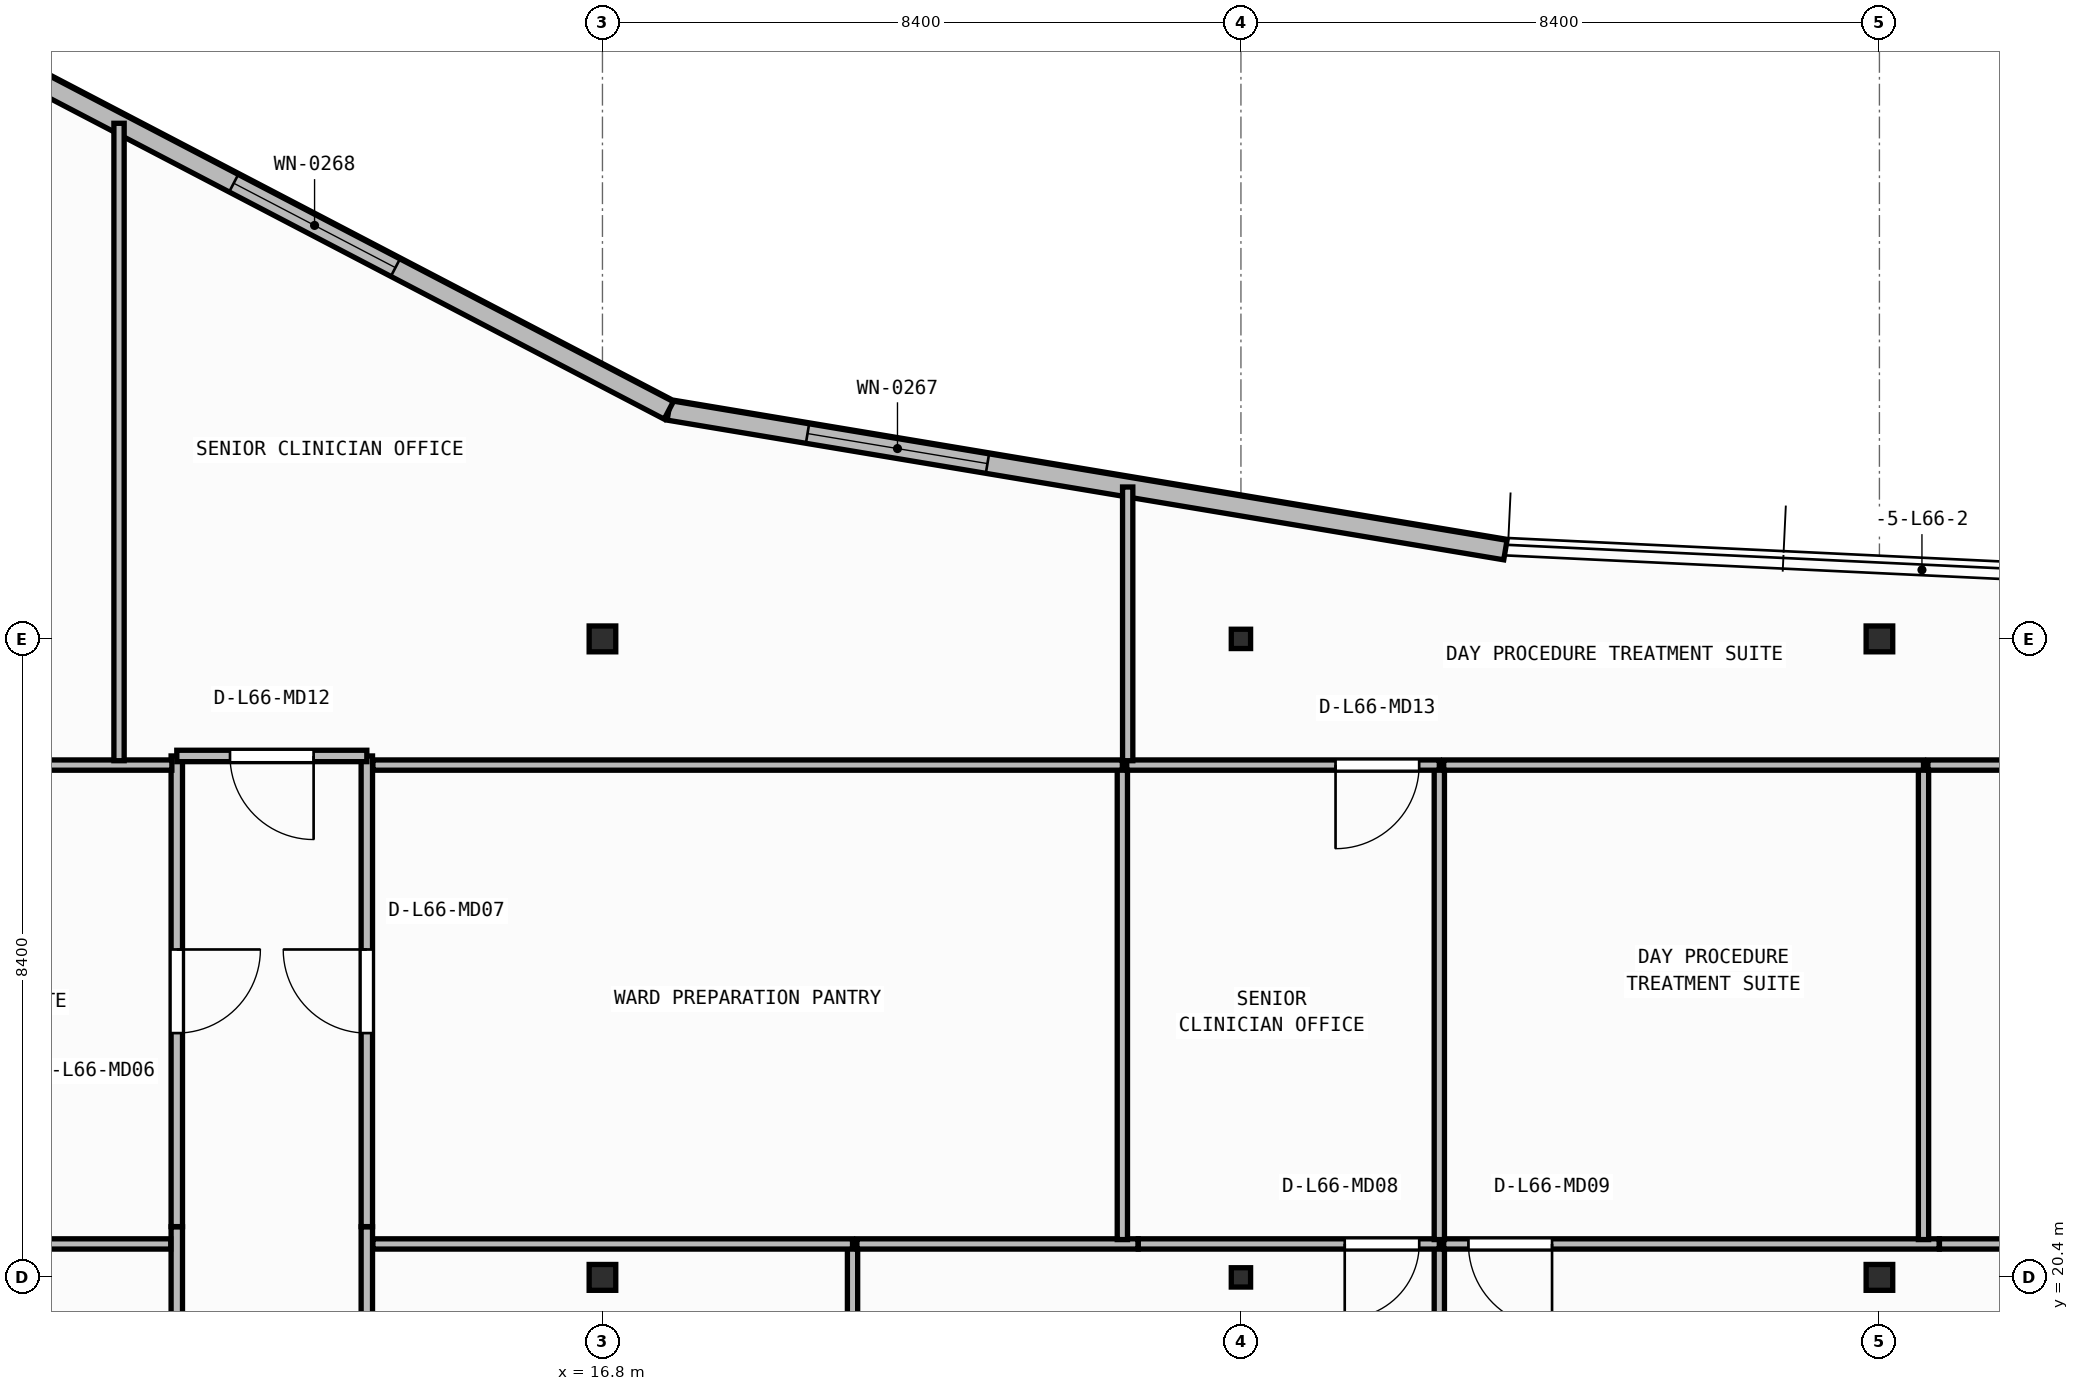
"""IFC4 building model, lengths in metres.
Left out: names, types, materials, properties, quantities, classifications, styles, units other than length and angle.
Written with IfcOpenShell. Run it as: python <this file> out.ifc"""

import sys

from ifc_helpers import new_model, si_unit, direction, frame, frame_2d, origin, origin_2d, place, context, subcontext, project, spatial, rectangle, i_section, extrude, element, fill, save


model = new_model("IFC4")
c1 = context("Model", 3, precision=1e-05, world=origin(), true_north=direction((0.0, 1.0)))
c2 = subcontext(c1, "Body", "Model", "MODEL_VIEW")
j1 = project(units=[si_unit("LENGTHUNIT", "METRE"), si_unit("PLANEANGLEUNIT", "RADIAN")], contexts=[c1])
p1 = place(None, origin())
s1 = spatial("IfcSite", under=j1, at=p1, CompositionType="ELEMENT")
p2 = place(p1, origin())
s2 = spatial("IfcBuilding", under=s1, at=p2, CompositionType="ELEMENT")
p3 = place(p2, frame((0.0, 0.0, 268.4)))
s3 = spatial("IfcBuildingStorey", under=s2, at=p3, CompositionType="ELEMENT", Elevation=268.4)
p4 = place(p3, frame((16.8, 20.4, 0.0), z_axis=(0.0, 0.0, 1.0), x_axis=(1.0, 0.0, 0.0)))
e1 = element("IfcColumn", 1, at=p4, inside=s3, PredefinedType="COLUMN", context=c2, shape_type="SweptSolid", body=[
    extrude(i_section(OverallWidth=0.35, OverallDepth=0.34, WebThickness=0.016, FlangeThickness=0.028, at=origin_2d()), origin(), (0.0, 0.0, 1.0), 3.95),
])
p5 = place(p3, frame((25.2, 20.4, 0.0), z_axis=(0.0, 0.0, 1.0), x_axis=(1.0, 0.0, 0.0)))
e2 = element("IfcColumn", 2, at=p5, inside=s3, PredefinedType="COLUMN", context=c2, shape_type="SweptSolid", body=[
    extrude(i_section(OverallWidth=0.254, OverallDepth=0.254, WebThickness=0.009, FlangeThickness=0.014, FilletRadius=0.013, at=origin_2d()), origin(), (0.0, 0.0, 1.0), 3.95),
])
for number, where, z_axis, x_axis in (
    (3, (33.6, 20.4, 0.0), (0.0, 0.0, 1.0), (1.0, 0.0, 0.0)),
    (4, (16.8, 28.8, 0.0), (0.0, 0.0, 1.0), (1.0, 0.0, 0.0)),
):
    element("IfcColumn", number, at=place(p3, frame(where, z_axis=z_axis, x_axis=x_axis)), inside=s3, PredefinedType="COLUMN", context=c2, shape_type="SweptSolid", body=[
        extrude(i_section(OverallWidth=0.35, OverallDepth=0.34, WebThickness=0.016, FlangeThickness=0.028, at=origin_2d()), origin(), (0.0, 0.0, 1.0), 3.95),
    ])
p6 = place(p3, frame((25.2, 28.8, 0.0), z_axis=(0.0, 0.0, 1.0), x_axis=(1.0, 0.0, 0.0)))
e5 = element("IfcColumn", 5, at=p6, inside=s3, PredefinedType="COLUMN", context=c2, shape_type="SweptSolid", body=[
    extrude(i_section(OverallWidth=0.254, OverallDepth=0.254, WebThickness=0.009, FlangeThickness=0.014, FilletRadius=0.013, at=origin_2d()), origin(), (0.0, 0.0, 1.0), 3.95),
])
p7 = place(p3, frame((33.6, 28.8, 0.0), z_axis=(0.0, 0.0, 1.0), x_axis=(1.0, 0.0, 0.0)))
e6 = element("IfcColumn", 6, at=p7, inside=s3, PredefinedType="COLUMN", context=c2, shape_type="SweptSolid", body=[
    extrude(i_section(OverallWidth=0.35, OverallDepth=0.34, WebThickness=0.016, FlangeThickness=0.028, at=origin_2d()), origin(), (0.0, 0.0, 1.0), 3.95),
])
p8 = place(p3, frame((28.679, 29.969, 0.0), z_axis=(0.0, 0.0, 1.0), x_axis=(-0.986343023061, 0.164704100918, 0.0)))
e7 = element("IfcWall", 7, at=p8, inside=s3, PredefinedType="STANDARD", context=c2, shape_type="SweptSolid", body=[
    extrude(rectangle(XDim=11.159, YDim=0.26, at=frame_2d((5.579, 0.0))), origin(), (0.0, 0.0, 1.0), 3.71),
])
p9 = place(p8, frame((6.908, 0.0, 0.9)))
e8 = element("IfcOpeningElement", 8, at=p9, cuts=e7, PredefinedType="OPENING", context=c2, shape_type="SweptSolid", body=[
    extrude(rectangle(XDim=2.4, YDim=1.65, at=frame_2d((1.2, 0.825))), frame((0.0, 0.14, 0.0), z_axis=(0.0, -1.0, 0.0), x_axis=(1.0, 0.0, 0.0)), (0.0, 0.0, 1.0), 0.28),
])
p10 = place(p3, frame((17.673, 31.806, 0.0), z_axis=(0.0, 0.0, 1.0), x_axis=(-0.886426635565, 0.462869117311, 0.0)))
e9 = element("IfcWall", 9, at=p10, inside=s3, PredefinedType="STANDARD", context=c2, shape_type="SweptSolid", body=[
    extrude(rectangle(XDim=10.514, YDim=0.26, at=frame_2d((5.257, 0.0))), origin(), (0.0, 0.0, 1.0), 3.71),
])
p11 = place(p10, frame((4.057, 0.0, 0.9)))
e10 = element("IfcOpeningElement", 10, at=p11, cuts=e9, PredefinedType="OPENING", context=c2, shape_type="SweptSolid", body=[
    extrude(rectangle(XDim=2.4, YDim=1.65, at=frame_2d((1.2, 0.825))), frame((0.0, 0.14, 0.0), z_axis=(0.0, -1.0, 0.0), x_axis=(1.0, 0.0, 0.0)), (0.0, 0.0, 1.0), 0.28),
])
for number, where, z_axis, x_axis in (
    (11, (11.2, 21.066, 0.0), (0.0, 0.0, 1.0), (0.0, -1.0, 0.0)),
    (12, (13.7, 14.7, 0.0), (0.0, 0.0, 1.0), (0.0, 1.0, 0.0)),
):
    element("IfcWall", number, at=place(p3, frame(where, z_axis=z_axis, x_axis=x_axis)), inside=s3, PredefinedType="PARTITIONING", context=c2, shape_type="SweptSolid", body=[
        extrude(rectangle(XDim=6.366, YDim=0.15, at=frame_2d((3.183, 0.0))), origin(), (0.0, 0.0, 1.0), 3.71),
    ])
p12 = place(p3, frame((11.2, 27.26, 0.0), z_axis=(0.0, 0.0, 1.0), x_axis=(0.0, -1.0, 0.0)))
e13 = element("IfcWall", 13, at=p12, inside=s3, PredefinedType="PARTITIONING", context=c2, shape_type="SweptSolid", body=[
    extrude(rectangle(XDim=6.192, YDim=0.15, at=frame_2d((3.096, 0.0))), origin(), (0.0, 0.0, 1.0), 3.71),
])
p13 = place(p12, frame((2.546, 0.0, 0.0)))
e14 = element("IfcOpeningElement", 14, at=p13, cuts=e13, PredefinedType="OPENING", context=c2, shape_type="SweptSolid", body=[
    extrude(rectangle(XDim=1.1, YDim=2.1, at=frame_2d((0.55, 1.05))), frame((0.0, 0.085, 0.0), z_axis=(0.0, -1.0, 0.0), x_axis=(1.0, 0.0, 0.0)), (0.0, 0.0, 1.0), 0.17),
])
p14 = place(p3, frame((13.7, 21.068, 0.0), z_axis=(0.0, 0.0, 1.0), x_axis=(0.0, 1.0, 0.0)))
e15 = element("IfcWall", 15, at=p14, inside=s3, PredefinedType="PARTITIONING", context=c2, shape_type="SweptSolid", body=[
    extrude(rectangle(XDim=6.192, YDim=0.15, at=frame_2d((3.096, 0.0))), origin(), (0.0, 0.0, 1.0), 3.71),
])
p15 = place(p14, frame((2.546, 0.0, 0.0)))
e16 = element("IfcOpeningElement", 16, at=p15, cuts=e15, PredefinedType="OPENING", context=c2, shape_type="SweptSolid", body=[
    extrude(rectangle(XDim=1.1, YDim=2.1, at=frame_2d((0.55, 1.05))), frame((0.0, 0.085, 0.0), z_axis=(0.0, -1.0, 0.0), x_axis=(1.0, 0.0, 0.0)), (0.0, 0.0, 1.0), 0.17),
])
p16 = place(p3, frame((13.7, 27.26, 0.0), z_axis=(0.0, 0.0, 1.0), x_axis=(-1.0, 0.0, 0.0)))
e17 = element("IfcWall", 17, at=p16, inside=s3, PredefinedType="PARTITIONING", context=c2, shape_type="SweptSolid", body=[
    extrude(rectangle(XDim=2.5, YDim=0.15, at=frame_2d((1.25, 0.0))), origin(), (0.0, 0.0, 1.0), 3.71),
])
p17 = place(p16, frame((0.7, 0.0, 0.0)))
e18 = element("IfcOpeningElement", 18, at=p17, cuts=e17, PredefinedType="OPENING", context=c2, shape_type="SweptSolid", body=[
    extrude(rectangle(XDim=1.1, YDim=2.1, at=frame_2d((0.55, 1.05))), frame((0.0, 0.085, 0.0), z_axis=(0.0, -1.0, 0.0), x_axis=(1.0, 0.0, 0.0)), (0.0, 0.0, 1.0), 0.17),
])
p18 = place(p3, frame((11.12, 20.84, 0.0), z_axis=(0.0, 0.0, 1.0), x_axis=(-1.0, 0.0, 0.0)))
e19 = element("IfcWall", 19, at=p18, inside=s3, PredefinedType="PARTITIONING", context=c2, shape_type="SweptSolid", body=[
    extrude(rectangle(XDim=4.303, YDim=0.135, at=frame_2d((2.151, 0.0))), origin(), (0.0, 0.0, 1.0), 3.157),
])
p19 = place(p3, frame((20.09, 14.76, 0.0), z_axis=(0.0, 0.0, 1.0), x_axis=(0.0, 1.0, 0.0)))
e20 = element("IfcWall", 20, at=p19, inside=s3, PredefinedType="PARTITIONING", context=c2, shape_type="SweptSolid", body=[
    extrude(rectangle(XDim=6.08, YDim=0.135, at=frame_2d((3.04, 0.0))), origin(), (0.0, 0.0, 1.0), 3.71),
])
p20 = place(p3, frame((20.09, 20.84, 0.0), z_axis=(0.0, 0.0, 1.0), x_axis=(-1.0, 0.0, 0.0)))
e21 = element("IfcWall", 21, at=p20, inside=s3, PredefinedType="PARTITIONING", context=c2, shape_type="SweptSolid", body=[
    extrude(rectangle(XDim=6.31, YDim=0.135, at=frame_2d((3.155, 0.0))), origin(), (0.0, 0.0, 1.0), 3.157),
])
p21 = place(p3, frame((27.81, 14.76, 0.0), z_axis=(0.0, 0.0, 1.0), x_axis=(0.0, 1.0, 0.0)))
e22 = element("IfcWall", 22, at=p21, inside=s3, PredefinedType="PARTITIONING", context=c2, shape_type="SweptSolid", body=[
    extrude(rectangle(XDim=6.08, YDim=0.135, at=frame_2d((3.04, 0.0))), origin(), (0.0, 0.0, 1.0), 3.71),
])
p22 = place(p3, frame((23.847, 20.84, 0.0), z_axis=(0.0, 0.0, 1.0), x_axis=(-1.0, 0.0, 0.0)))
e23 = element("IfcWall", 23, at=p22, inside=s3, PredefinedType="PARTITIONING", context=c2, shape_type="SweptSolid", body=[
    extrude(rectangle(XDim=3.7, YDim=0.135, at=frame_2d((1.85, 0.0))), origin(), (0.0, 0.0, 1.0), 3.157),
])
p23 = place(p3, frame((27.81, 20.84, 0.0), z_axis=(0.0, 0.0, 1.0), x_axis=(-1.0, 0.0, 0.0)))
e24 = element("IfcWall", 24, at=p23, inside=s3, PredefinedType="PARTITIONING", context=c2, shape_type="SweptSolid", body=[
    extrude(rectangle(XDim=3.96, YDim=0.135, at=frame_2d((1.98, 0.0))), origin(), (0.0, 0.0, 1.0), 3.157),
])
p24 = place(p23, frame((0.264, 0.0, 0.0)))
e25 = element("IfcOpeningElement", 25, at=p24, cuts=e24, PredefinedType="OPENING", context=c2, shape_type="SweptSolid", body=[
    extrude(rectangle(XDim=0.98, YDim=2.1, at=frame_2d((0.49, 1.05))), frame((0.0, 0.077, 0.0), z_axis=(0.0, -1.0, 0.0), x_axis=(1.0, 0.0, 0.0)), (0.0, 0.0, 1.0), 0.155),
])
p25 = place(p3, frame((34.387, 20.84, 0.0), z_axis=(0.0, 0.0, 1.0), x_axis=(-1.0, 0.0, 0.0)))
e26 = element("IfcWall", 26, at=p25, inside=s3, PredefinedType="PARTITIONING", context=c2, shape_type="SweptSolid", body=[
    extrude(rectangle(XDim=6.52, YDim=0.135, at=frame_2d((3.26, 0.0))), origin(), (0.0, 0.0, 1.0), 3.157),
])
p26 = place(p25, frame((5.094, 0.0, 0.0)))
e27 = element("IfcOpeningElement", 27, at=p26, cuts=e26, PredefinedType="OPENING", context=c2, shape_type="SweptSolid", body=[
    extrude(rectangle(XDim=1.1, YDim=2.1, at=frame_2d((0.55, 1.05))), frame((0.0, 0.077, 0.0), z_axis=(0.0, -1.0, 0.0), x_axis=(1.0, 0.0, 0.0)), (0.0, 0.0, 1.0), 0.155),
])
p27 = place(p3, frame((37.73, 20.84, 0.0), z_axis=(0.0, 0.0, 1.0), x_axis=(-1.0, 0.0, 0.0)))
e28 = element("IfcWall", 28, at=p27, inside=s3, PredefinedType="PARTITIONING", context=c2, shape_type="SweptSolid", body=[
    extrude(rectangle(XDim=3.341, YDim=0.135, at=frame_2d((1.67, 0.0))), origin(), (0.0, 0.0, 1.0), 3.71),
])
p28 = place(p27, frame((0.246, 0.0, 0.0)))
e29 = element("IfcOpeningElement", 29, at=p28, cuts=e28, PredefinedType="OPENING", context=c2, shape_type="SweptSolid", body=[
    extrude(rectangle(XDim=1.1, YDim=2.1, at=frame_2d((0.55, 1.05))), frame((0.0, 0.077, 0.0), z_axis=(0.0, -1.0, 0.0), x_axis=(1.0, 0.0, 0.0)), (0.0, 0.0, 1.0), 0.155),
])
p29 = place(p3, frame((11.135, 27.14, 0.0), z_axis=(0.0, 0.0, 1.0), x_axis=(-1.0, 0.0, 0.0)))
e30 = element("IfcWall", 30, at=p29, inside=s3, PredefinedType="PARTITIONING", context=c2, shape_type="SweptSolid", body=[
    extrude(rectangle(XDim=10.895, YDim=0.135, at=frame_2d((5.448, 0.0))), origin(), (0.0, 0.0, 1.0), 3.71),
])
p30 = place(p29, frame((5.837, 0.0, 0.0)))
e31 = element("IfcOpeningElement", 31, at=p30, cuts=e30, PredefinedType="OPENING", context=c2, shape_type="SweptSolid", body=[
    extrude(rectangle(XDim=1.1, YDim=2.1, at=frame_2d((0.55, 1.05))), frame((0.0, 0.077, 0.0), z_axis=(0.0, -1.0, 0.0), x_axis=(1.0, 0.0, 0.0)), (0.0, 0.0, 1.0), 0.155),
])
p31 = place(p3, frame((23.64, 20.897, 0.0), z_axis=(0.0, 0.0, 1.0), x_axis=(0.0, 1.0, 0.0)))
e32 = element("IfcWall", 32, at=p31, inside=s3, PredefinedType="PARTITIONING", context=c2, shape_type="SweptSolid", body=[
    extrude(rectangle(XDim=6.242, YDim=0.135, at=frame_2d((3.121, 0.0))), origin(), (0.0, 0.0, 1.0), 3.71),
])
p32 = place(p3, frame((23.64, 27.14, 0.0), z_axis=(0.0, 0.0, 1.0), x_axis=(-1.0, 0.0, 0.0)))
e33 = element("IfcWall", 33, at=p32, inside=s3, PredefinedType="PARTITIONING", context=c2, shape_type="SweptSolid", body=[
    extrude(rectangle(XDim=9.86, YDim=0.135, at=frame_2d((4.93, 0.0))), origin(), (0.0, 0.0, 1.0), 3.71),
])
p33 = place(p3, frame((27.81, 20.897, 0.0), z_axis=(0.0, 0.0, 1.0), x_axis=(0.0, 1.0, 0.0)))
e34 = element("IfcWall", 34, at=p33, inside=s3, PredefinedType="PARTITIONING", context=c2, shape_type="SweptSolid", body=[
    extrude(rectangle(XDim=6.242, YDim=0.135, at=frame_2d((3.121, 0.0))), origin(), (0.0, 0.0, 1.0), 3.71),
])
p34 = place(p3, frame((27.81, 27.14, 0.0), z_axis=(0.0, 0.0, 1.0), x_axis=(-1.0, 0.0, 0.0)))
e35 = element("IfcWall", 35, at=p34, inside=s3, PredefinedType="PARTITIONING", context=c2, shape_type="SweptSolid", body=[
    extrude(rectangle(XDim=4.113, YDim=0.135, at=frame_2d((2.056, 0.0))), origin(), (0.0, 0.0, 1.0), 3.71),
])
p35 = place(p34, frame((0.265, 0.0, 0.0)))
e36 = element("IfcOpeningElement", 36, at=p35, cuts=e35, PredefinedType="OPENING", context=c2, shape_type="SweptSolid", body=[
    extrude(rectangle(XDim=1.1, YDim=2.1, at=frame_2d((0.55, 1.05))), frame((0.0, 0.077, 0.0), z_axis=(0.0, -1.0, 0.0), x_axis=(1.0, 0.0, 0.0)), (0.0, 0.0, 1.0), 0.155),
])
p36 = place(p3, frame((34.18, 20.897, 0.0), z_axis=(0.0, 0.0, 1.0), x_axis=(0.0, 1.0, 0.0)))
e37 = element("IfcWall", 37, at=p36, inside=s3, PredefinedType="PARTITIONING", context=c2, shape_type="SweptSolid", body=[
    extrude(rectangle(XDim=6.242, YDim=0.135, at=frame_2d((3.121, 0.0))), origin(), (0.0, 0.0, 1.0), 3.71),
])
p37 = place(p3, frame((34.18, 27.14, 0.0), z_axis=(0.0, 0.0, 1.0), x_axis=(-1.0, 0.0, 0.0)))
e38 = element("IfcWall", 38, at=p37, inside=s3, PredefinedType="PARTITIONING", context=c2, shape_type="SweptSolid", body=[
    extrude(rectangle(XDim=6.312, YDim=0.135, at=frame_2d((3.156, 0.0))), origin(), (0.0, 0.0, 1.0), 3.71),
])
p38 = place(p3, frame((39.638, 27.14, 0.0), z_axis=(0.0, 0.0, 1.0), x_axis=(-1.0, 0.0, 0.0)))
e39 = element("IfcWall", 39, at=p38, inside=s3, PredefinedType="PARTITIONING", context=c2, shape_type="SweptSolid", body=[
    extrude(rectangle(XDim=5.4, YDim=0.135, at=frame_2d((2.7, 0.0))), origin(), (0.0, 0.0, 1.0), 3.71),
])
p39 = place(p3, frame((10.44, 27.198, 0.0), z_axis=(0.0, 0.0, 1.0), x_axis=(0.0, 1.0, 0.0)))
e40 = element("IfcWall", 40, at=p39, inside=s3, PredefinedType="PARTITIONING", context=c2, shape_type="SweptSolid", body=[
    extrude(rectangle(XDim=8.385, YDim=0.135, at=frame_2d((4.193, 0.0))), origin(), (0.0, 0.0, 1.0), 3.71),
])
p40 = place(p3, frame((23.71, 27.198, 0.0), z_axis=(0.0, 0.0, 1.0), x_axis=(0.0, 1.0, 0.0)))
e41 = element("IfcWall", 41, at=p40, inside=s3, PredefinedType="PARTITIONING", context=c2, shape_type="SweptSolid", body=[
    extrude(rectangle(XDim=3.601, YDim=0.135, at=frame_2d((1.8, 0.0))), origin(), (0.0, 0.0, 1.0), 3.71),
])
p41 = place(p9, origin())
e42 = element("IfcWindow", 42, at=p41, inside=s3, PartitioningType="SINGLE_PANEL", PredefinedType="WINDOW", context=c2, shape_type="SweptSolid", body=[
    extrude(rectangle(XDim=2.4, YDim=1.65, at=frame_2d((1.2, 0.825))), frame((0.0, 0.03, 0.0), z_axis=(0.0, -1.0, 0.0), x_axis=(1.0, 0.0, 0.0)), (0.0, 0.0, 1.0), 0.06),
])
fill(e8, e42)
p42 = place(p11, origin())
e43 = element("IfcWindow", 43, at=p42, inside=s3, PartitioningType="SINGLE_PANEL", PredefinedType="WINDOW", context=c2, shape_type="SweptSolid", body=[
    extrude(rectangle(XDim=2.4, YDim=1.65, at=frame_2d((1.2, 0.825))), frame((0.0, 0.03, 0.0), z_axis=(0.0, -1.0, 0.0), x_axis=(1.0, 0.0, 0.0)), (0.0, 0.0, 1.0), 0.06),
])
fill(e10, e43)
p43 = place(p13, origin())
e44 = element("IfcDoor", 44, at=p43, inside=s3, OperationType="SINGLE_SWING_LEFT", PredefinedType="DOOR", context=c2, shape_type="SweptSolid", body=[
    extrude(rectangle(XDim=1.1, YDim=2.1, at=frame_2d((0.55, 1.05))), frame((0.0, 0.025, 0.0), z_axis=(0.0, -1.0, 0.0), x_axis=(1.0, 0.0, 0.0)), (0.0, 0.0, 1.0), 0.05),
])
fill(e14, e44)
p44 = place(p15, origin())
e45 = element("IfcDoor", 45, at=p44, inside=s3, OperationType="SINGLE_SWING_RIGHT", PredefinedType="DOOR", context=c2, shape_type="SweptSolid", body=[
    extrude(rectangle(XDim=1.1, YDim=2.1, at=frame_2d((0.55, 1.05))), frame((0.0, 0.025, 0.0), z_axis=(0.0, -1.0, 0.0), x_axis=(1.0, 0.0, 0.0)), (0.0, 0.0, 1.0), 0.05),
])
fill(e16, e45)
p45 = place(p17, origin())
e46 = element("IfcDoor", 46, at=p45, inside=s3, OperationType="SINGLE_SWING_LEFT", PredefinedType="DOOR", context=c2, shape_type="SweptSolid", body=[
    extrude(rectangle(XDim=1.1, YDim=2.1, at=frame_2d((0.55, 1.05))), frame((0.0, 0.025, 0.0), z_axis=(0.0, -1.0, 0.0), x_axis=(1.0, 0.0, 0.0)), (0.0, 0.0, 1.0), 0.05),
])
fill(e18, e46)
p46 = place(p24, origin())
e47 = element("IfcDoor", 47, at=p46, inside=s3, OperationType="SINGLE_SWING_RIGHT", PredefinedType="DOOR", context=c2, shape_type="SweptSolid", body=[
    extrude(rectangle(XDim=0.98, YDim=2.1, at=frame_2d((0.49, 1.05))), frame((0.0, 0.025, 0.0), z_axis=(0.0, -1.0, 0.0), x_axis=(1.0, 0.0, 0.0)), (0.0, 0.0, 1.0), 0.05),
])
fill(e25, e47)
p47 = place(p26, origin())
e48 = element("IfcDoor", 48, at=p47, inside=s3, OperationType="SINGLE_SWING_LEFT", PredefinedType="DOOR", context=c2, shape_type="SweptSolid", body=[
    extrude(rectangle(XDim=1.1, YDim=2.1, at=frame_2d((0.55, 1.05))), frame((0.0, 0.025, 0.0), z_axis=(0.0, -1.0, 0.0), x_axis=(1.0, 0.0, 0.0)), (0.0, 0.0, 1.0), 0.05),
])
fill(e27, e48)
p48 = place(p35, origin())
e49 = element("IfcDoor", 49, at=p48, inside=s3, OperationType="SINGLE_SWING_RIGHT", PredefinedType="DOOR", context=c2, shape_type="SweptSolid", body=[
    extrude(rectangle(XDim=1.1, YDim=2.1, at=frame_2d((0.55, 1.05))), frame((0.0, 0.025, 0.0), z_axis=(0.0, -1.0, 0.0), x_axis=(1.0, 0.0, 0.0)), (0.0, 0.0, 1.0), 0.05),
])
fill(e36, e49)
save(model, sys.argv[1])
